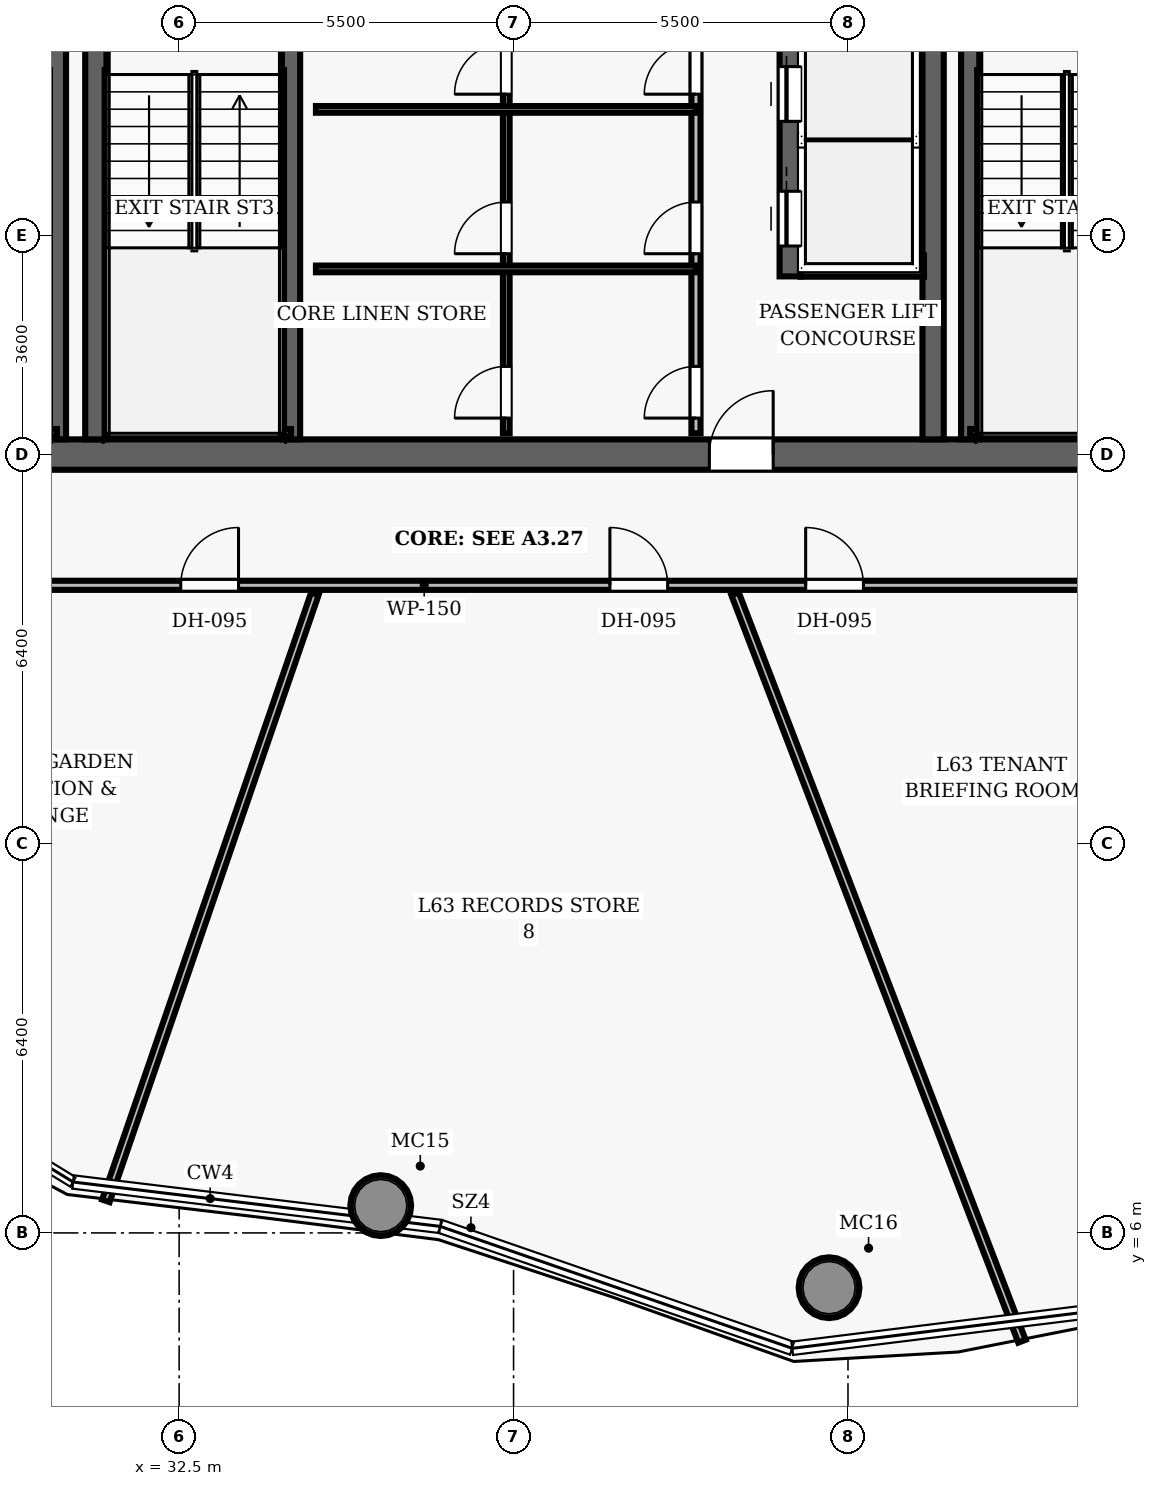
"""IFC4 building model, lengths in metres.
Left out: names, types, materials, properties, quantities, classifications, styles, units other than length and angle.
Written with IfcOpenShell. Run it as: python <this file> out.ifc"""

import sys

from ifc_helpers import new_model, si_unit, direction, frame, frame_2d, origin, origin_2d, place, context, subcontext, project, spatial, rectangle, hollow_circle, extrude, element, fill, save


model = new_model("IFC4")
c1 = context("Model", 3, precision=1e-05, world=origin(), true_north=direction((0.0, 1.0)))
c2 = subcontext(c1, "Body", "Model", "MODEL_VIEW")
j1 = project(units=[si_unit("LENGTHUNIT", "METRE"), si_unit("PLANEANGLEUNIT", "RADIAN")], contexts=[c1])
p1 = place(None, origin())
s1 = spatial("IfcSite", under=j1, at=p1, CompositionType="ELEMENT")
p2 = place(p1, origin())
s2 = spatial("IfcBuilding", under=s1, at=p2, CompositionType="ELEMENT")
p3 = place(p2, frame((0.0, 0.0, 249.75)))
s3 = spatial("IfcBuildingStorey", under=s2, at=p3, CompositionType="ELEMENT", Elevation=249.75)
p4 = place(p3, frame((26.75, 18.8, 0.0), z_axis=(0.0, 0.0, 1.0), x_axis=(1.0, 0.0, 0.0)))
e1 = element("IfcWall", 1, at=p4, inside=s3, PredefinedType="SHEAR", context=c2, shape_type="SweptSolid", body=[
    extrude(rectangle(XDim=22.5, YDim=0.5, at=frame_2d((11.25, 0.0))), origin(), (0.0, 0.0, 1.0), 3.85),
])
p5 = place(p4, frame((14.47, 0.0, 0.0)))
e2 = element("IfcOpeningElement", 2, at=p5, cuts=e1, PredefinedType="OPENING", context=c2, shape_type="SweptSolid", body=[
    extrude(rectangle(XDim=1.05, YDim=2.15, at=frame_2d((0.525, 1.075))), frame((0.0, 0.26, 0.0), z_axis=(0.0, -1.0, 0.0), x_axis=(1.0, 0.0, 0.0)), (0.0, 0.0, 1.0), 0.52),
])
for number, where, z_axis, x_axis in (
    (3, (31.13, 19.05, 0.0), (0.0, 0.0, 1.0), (0.0, 1.0, 0.0)),
    (4, (44.9, 19.05, 0.0), (0.0, 0.0, 1.0), (0.0, 1.0, 0.0)),
):
    element("IfcWall", number, at=place(p3, frame(where, z_axis=z_axis, x_axis=x_axis)), inside=s3, PredefinedType="SHEAR", context=c2, shape_type="SweptSolid", body=[
        extrude(rectangle(XDim=13.9, YDim=0.35, at=frame_2d((6.95, 0.0))), origin(), (0.0, 0.0, 1.0), 3.85),
    ])
for number, where, z_axis, x_axis in (
    (5, (35.815, 6.449, 0.0), (0.0, 0.0, 1.0), (1.0, 0.0, 0.0)),
    (6, (43.188, 5.099, 0.0), (0.0, 0.0, 1.0), (1.0, 0.0, 0.0)),
):
    element("IfcColumn", number, at=place(p3, frame(where, z_axis=z_axis, x_axis=x_axis)), inside=s3, PredefinedType="COLUMN", context=c2, shape_type="SweptSolid", body=[
        extrude(hollow_circle(Radius=0.5, WallThickness=0.045, at=origin_2d()), origin(), (0.0, 0.0, 1.0), 3.85),
    ])
p6 = place(p3, frame((30.49, 19.05, 0.0), z_axis=(0.0, 0.0, 1.0), x_axis=(0.0, 1.0, 0.0)))
e7 = element("IfcWall", 7, at=p6, inside=s3, PredefinedType="SHEAR", context=c2, shape_type="SweptSolid", body=[
    extrude(rectangle(XDim=7.5, YDim=0.3, at=frame_2d((3.75, 0.0))), origin(), (0.0, 0.0, 1.0), 3.85),
])
p7 = place(p3, frame((27.395, 19.16, 0.0), z_axis=(0.0, 0.0, 1.0), x_axis=(1.0, 0.0, 0.0)))
e8 = element("IfcWall", 8, at=p7, inside=s3, PredefinedType="SHEAR", context=c2, shape_type="SweptSolid", body=[
    extrude(rectangle(XDim=3.095, YDim=0.12, at=frame_2d((1.547, 0.0))), origin(), (0.0, 0.0, 1.0), 3.85),
])
p8 = place(p3, frame((45.51, 19.05, 0.0), z_axis=(0.0, 0.0, 1.0), x_axis=(0.0, 1.0, 0.0)))
e9 = element("IfcWall", 9, at=p8, inside=s3, PredefinedType="SHEAR", context=c2, shape_type="SweptSolid", body=[
    extrude(rectangle(XDim=7.5, YDim=0.3, at=frame_2d((3.75, 0.0))), origin(), (0.0, 0.0, 1.0), 3.85),
])
p9 = place(p3, frame((45.51, 19.16, 0.0), z_axis=(0.0, 0.0, 1.0), x_axis=(1.0, 0.0, 0.0)))
e10 = element("IfcWall", 10, at=p9, inside=s3, PredefinedType="SHEAR", context=c2, shape_type="SweptSolid", body=[
    extrude(rectangle(XDim=3.095, YDim=0.12, at=frame_2d((1.547, 0.0))), origin(), (0.0, 0.0, 1.0), 3.85),
])
p10 = place(p3, frame((34.34, 19.05, 0.0), z_axis=(0.0, 0.0, 1.0), x_axis=(0.0, 1.0, 0.0)))
e11 = element("IfcWall", 11, at=p10, inside=s3, PredefinedType="SHEAR", context=c2, shape_type="SweptSolid", body=[
    extrude(rectangle(XDim=7.5, YDim=0.3, at=frame_2d((3.75, 0.0))), origin(), (0.0, 0.0, 1.0), 3.85),
])
p11 = place(p3, frame((31.3, 19.16, 0.0), z_axis=(0.0, 0.0, 1.0), x_axis=(1.0, 0.0, 0.0)))
e12 = element("IfcWall", 12, at=p11, inside=s3, PredefinedType="SHEAR", context=c2, shape_type="SweptSolid", body=[
    extrude(rectangle(XDim=3.04, YDim=0.12, at=frame_2d((1.52, 0.0))), origin(), (0.0, 0.0, 1.0), 3.85),
])
p12 = place(p3, frame((42.55, 21.73, 0.0), z_axis=(0.0, 0.0, 1.0), x_axis=(0.0, 1.0, 0.0)))
e13 = element("IfcWall", 13, at=p12, inside=s3, PredefinedType="SHEAR", context=c2, shape_type="SweptSolid", body=[
    extrude(rectangle(XDim=6.54, YDim=0.35, at=frame_2d((3.27, 0.0))), origin(), (0.0, 0.0, 1.0), 3.04),
])
p13 = place(p12, frame((0.5, 0.0, 0.0)))
e14 = element("IfcOpeningElement", 14, at=p13, cuts=e13, PredefinedType="OPENING", context=c2, shape_type="SweptSolid", body=[
    extrude(rectangle(XDim=0.9, YDim=2.15, at=frame_2d((0.45, 1.075))), frame((0.0, 0.185, 0.0), z_axis=(0.0, -1.0, 0.0), x_axis=(1.0, 0.0, 0.0)), (0.0, 0.0, 1.0), 0.37),
])
p14 = place(p12, frame((2.55, 0.0, 0.0)))
e15 = element("IfcOpeningElement", 15, at=p14, cuts=e13, PredefinedType="OPENING", context=c2, shape_type="SweptSolid", body=[
    extrude(rectangle(XDim=0.9, YDim=2.15, at=frame_2d((0.45, 1.075))), frame((0.0, 0.185, 0.0), z_axis=(0.0, -1.0, 0.0), x_axis=(1.0, 0.0, 0.0)), (0.0, 0.0, 1.0), 0.37),
])
p15 = place(p12, frame((4.6, 0.0, 0.0)))
e16 = element("IfcOpeningElement", 16, at=p15, cuts=e13, PredefinedType="OPENING", context=c2, shape_type="SweptSolid", body=[
    extrude(rectangle(XDim=0.9, YDim=2.15, at=frame_2d((0.45, 1.075))), frame((0.0, 0.185, 0.0), z_axis=(0.0, -1.0, 0.0), x_axis=(1.0, 0.0, 0.0)), (0.0, 0.0, 1.0), 0.37),
])
p16 = place(p3, frame((42.72, 21.9, 0.0), z_axis=(0.0, 0.0, 1.0), x_axis=(1.0, 0.0, 0.0)))
e17 = element("IfcWall", 17, at=p16, inside=s3, PredefinedType="SHEAR", context=c2, shape_type="SweptSolid", body=[
    extrude(rectangle(XDim=2.03, YDim=0.35, at=frame_2d((1.015, 0.0))), origin(), (0.0, 0.0, 1.0), 3.04),
])
p17 = place(p3, frame((41.0, 19.15, 0.0), z_axis=(0.0, 0.0, 1.0), x_axis=(0.0, 1.0, 0.0)))
e18 = element("IfcWall", 18, at=p17, inside=s3, PredefinedType="PARTITIONING", context=c2, shape_type="SweptSolid", body=[
    extrude(rectangle(XDim=7.95, YDim=0.15, at=frame_2d((3.975, 0.0))), origin(), (0.0, 0.0, 1.0), 3.04),
])
p18 = place(p17, frame((0.25, 0.0, 0.0)))
e19 = element("IfcOpeningElement", 19, at=p18, cuts=e18, PredefinedType="OPENING", context=c2, shape_type="SweptSolid", body=[
    extrude(rectangle(XDim=0.85, YDim=2.1, at=frame_2d((0.425, 1.05))), frame((0.0, 0.085, 0.0), z_axis=(0.0, -1.0, 0.0), x_axis=(1.0, 0.0, 0.0)), (0.0, 0.0, 1.0), 0.17),
])
p19 = place(p17, frame((2.953, 0.0, 0.0)))
e20 = element("IfcOpeningElement", 20, at=p19, cuts=e18, PredefinedType="OPENING", context=c2, shape_type="SweptSolid", body=[
    extrude(rectangle(XDim=0.85, YDim=2.1, at=frame_2d((0.425, 1.05))), frame((0.0, 0.085, 0.0), z_axis=(0.0, -1.0, 0.0), x_axis=(1.0, 0.0, 0.0)), (0.0, 0.0, 1.0), 0.17),
])
p20 = place(p17, frame((5.576, 0.0, 0.0)))
e21 = element("IfcOpeningElement", 21, at=p20, cuts=e18, PredefinedType="OPENING", context=c2, shape_type="SweptSolid", body=[
    extrude(rectangle(XDim=0.85, YDim=2.1, at=frame_2d((0.425, 1.05))), frame((0.0, 0.085, 0.0), z_axis=(0.0, -1.0, 0.0), x_axis=(1.0, 0.0, 0.0)), (0.0, 0.0, 1.0), 0.17),
])
p21 = place(p3, frame((37.88, 19.15, 0.0), z_axis=(0.0, 0.0, 1.0), x_axis=(0.0, 1.0, 0.0)))
e22 = element("IfcWall", 22, at=p21, inside=s3, PredefinedType="PARTITIONING", context=c2, shape_type="SweptSolid", body=[
    extrude(rectangle(XDim=7.95, YDim=0.11, at=frame_2d((3.975, 0.0))), origin(), (0.0, 0.0, 1.0), 3.04),
])
p22 = place(p21, frame((0.25, 0.0, 0.0)))
e23 = element("IfcOpeningElement", 23, at=p22, cuts=e22, PredefinedType="OPENING", context=c2, shape_type="SweptSolid", body=[
    extrude(rectangle(XDim=0.85, YDim=2.1, at=frame_2d((0.425, 1.05))), frame((0.0, 0.065, 0.0), z_axis=(0.0, -1.0, 0.0), x_axis=(1.0, 0.0, 0.0)), (0.0, 0.0, 1.0), 0.13),
])
p23 = place(p21, frame((2.953, 0.0, 0.0)))
e24 = element("IfcOpeningElement", 24, at=p23, cuts=e22, PredefinedType="OPENING", context=c2, shape_type="SweptSolid", body=[
    extrude(rectangle(XDim=0.85, YDim=2.1, at=frame_2d((0.425, 1.05))), frame((0.0, 0.065, 0.0), z_axis=(0.0, -1.0, 0.0), x_axis=(1.0, 0.0, 0.0)), (0.0, 0.0, 1.0), 0.13),
])
p24 = place(p21, frame((5.576, 0.0, 0.0)))
e25 = element("IfcOpeningElement", 25, at=p24, cuts=e22, PredefinedType="OPENING", context=c2, shape_type="SweptSolid", body=[
    extrude(rectangle(XDim=0.85, YDim=2.1, at=frame_2d((0.425, 1.05))), frame((0.0, 0.065, 0.0), z_axis=(0.0, -1.0, 0.0), x_axis=(1.0, 0.0, 0.0)), (0.0, 0.0, 1.0), 0.13),
])
for number, where, z_axis, x_axis in (
    (26, (34.75, 21.853, 0.0), (0.0, 0.0, 1.0), (1.0, 0.0, 0.0)),
    (27, (34.75, 24.477, 0.0), (0.0, 0.0, 1.0), (1.0, 0.0, 0.0)),
):
    element("IfcWall", number, at=place(p3, frame(where, z_axis=z_axis, x_axis=x_axis)), inside=s3, PredefinedType="PARTITIONING", context=c2, shape_type="SweptSolid", body=[
        extrude(rectangle(XDim=6.25, YDim=0.11, at=frame_2d((3.125, 0.0))), origin(), (0.0, 0.0, 1.0), 3.04),
    ])
p25 = place(p3, frame((26.9, 16.65, 0.0), z_axis=(0.0, 0.0, 1.0), x_axis=(1.0, 0.0, 0.0)))
e28 = element("IfcWall", 28, at=p25, inside=s3, PredefinedType="PARTITIONING", context=c2, shape_type="SweptSolid", body=[
    extrude(rectangle(XDim=22.2, YDim=0.15, at=frame_2d((11.1, 0.0))), origin(), (0.0, 0.0, 1.0), 3.04),
])
p26 = place(p25, frame((5.627, 0.0, 0.0)))
e29 = element("IfcOpeningElement", 29, at=p26, cuts=e28, PredefinedType="OPENING", context=c2, shape_type="SweptSolid", body=[
    extrude(rectangle(XDim=0.95, YDim=2.15, at=frame_2d((0.475, 1.075))), frame((0.0, 0.085, 0.0), z_axis=(0.0, -1.0, 0.0), x_axis=(1.0, 0.0, 0.0)), (0.0, 0.0, 1.0), 0.17),
])
p27 = place(p25, frame((12.684, 0.0, 0.0)))
e30 = element("IfcOpeningElement", 30, at=p27, cuts=e28, PredefinedType="OPENING", context=c2, shape_type="SweptSolid", body=[
    extrude(rectangle(XDim=0.95, YDim=2.15, at=frame_2d((0.475, 1.075))), frame((0.0, 0.085, 0.0), z_axis=(0.0, -1.0, 0.0), x_axis=(1.0, 0.0, 0.0)), (0.0, 0.0, 1.0), 0.17),
])
p28 = place(p25, frame((15.904, 0.0, 0.0)))
e31 = element("IfcOpeningElement", 31, at=p28, cuts=e28, PredefinedType="OPENING", context=c2, shape_type="SweptSolid", body=[
    extrude(rectangle(XDim=0.95, YDim=2.15, at=frame_2d((0.475, 1.075))), frame((0.0, 0.085, 0.0), z_axis=(0.0, -1.0, 0.0), x_axis=(1.0, 0.0, 0.0)), (0.0, 0.0, 1.0), 0.17),
])
p29 = place(p3, frame((34.732, 16.51, 0.0), z_axis=(0.0, 0.0, 1.0), x_axis=(-0.325577330782, -0.945515415887, 0.0)))
e32 = element("IfcWall", 32, at=p29, inside=s3, PredefinedType="PARTITIONING", context=c2, shape_type="SweptSolid", body=[
    extrude(rectangle(XDim=10.558, YDim=0.13, at=frame_2d((5.279, 0.0))), origin(), (0.0, 0.0, 1.0), 3.04),
])
p30 = place(p3, frame((41.643, 16.51, 0.0), z_axis=(0.0, 0.0, 1.0), x_axis=(0.358373851229, -0.933578161032, 0.0)))
e33 = element("IfcWall", 33, at=p30, inside=s3, PredefinedType="PARTITIONING", context=c2, shape_type="SweptSolid", body=[
    extrude(rectangle(XDim=13.166, YDim=0.13, at=frame_2d((6.583, 0.0))), origin(), (0.0, 0.0, 1.0), 3.04),
])
p31 = place(p5, origin())
e34 = element("IfcDoor", 34, at=p31, inside=s3, OperationType="SINGLE_SWING_RIGHT", PredefinedType="DOOR", context=c2, shape_type="SweptSolid", body=[
    extrude(rectangle(XDim=1.05, YDim=2.15, at=frame_2d((0.525, 1.075))), frame((0.0, 0.025, 0.0), z_axis=(0.0, -1.0, 0.0), x_axis=(1.0, 0.0, 0.0)), (0.0, 0.0, 1.0), 0.05),
])
fill(e2, e34)
p32 = place(p18, origin())
e35 = element("IfcDoor", 35, at=p32, inside=s3, OperationType="SINGLE_SWING_LEFT", PredefinedType="DOOR", context=c2, shape_type="SweptSolid", body=[
    extrude(rectangle(XDim=0.85, YDim=2.1, at=frame_2d((0.425, 1.05))), frame((0.0, 0.025, 0.0), z_axis=(0.0, -1.0, 0.0), x_axis=(1.0, 0.0, 0.0)), (0.0, 0.0, 1.0), 0.05),
])
fill(e19, e35)
p33 = place(p22, origin())
e36 = element("IfcDoor", 36, at=p33, inside=s3, OperationType="SINGLE_SWING_LEFT", PredefinedType="DOOR", context=c2, shape_type="SweptSolid", body=[
    extrude(rectangle(XDim=0.85, YDim=2.1, at=frame_2d((0.425, 1.05))), frame((0.0, 0.025, 0.0), z_axis=(0.0, -1.0, 0.0), x_axis=(1.0, 0.0, 0.0)), (0.0, 0.0, 1.0), 0.05),
])
fill(e23, e36)
p34 = place(p19, origin())
e37 = element("IfcDoor", 37, at=p34, inside=s3, OperationType="SINGLE_SWING_LEFT", PredefinedType="DOOR", context=c2, shape_type="SweptSolid", body=[
    extrude(rectangle(XDim=0.85, YDim=2.1, at=frame_2d((0.425, 1.05))), frame((0.0, 0.025, 0.0), z_axis=(0.0, -1.0, 0.0), x_axis=(1.0, 0.0, 0.0)), (0.0, 0.0, 1.0), 0.05),
])
fill(e20, e37)
p35 = place(p23, origin())
e38 = element("IfcDoor", 38, at=p35, inside=s3, OperationType="SINGLE_SWING_LEFT", PredefinedType="DOOR", context=c2, shape_type="SweptSolid", body=[
    extrude(rectangle(XDim=0.85, YDim=2.1, at=frame_2d((0.425, 1.05))), frame((0.0, 0.025, 0.0), z_axis=(0.0, -1.0, 0.0), x_axis=(1.0, 0.0, 0.0)), (0.0, 0.0, 1.0), 0.05),
])
fill(e24, e38)
p36 = place(p20, origin())
e39 = element("IfcDoor", 39, at=p36, inside=s3, OperationType="SINGLE_SWING_LEFT", PredefinedType="DOOR", context=c2, shape_type="SweptSolid", body=[
    extrude(rectangle(XDim=0.85, YDim=2.1, at=frame_2d((0.425, 1.05))), frame((0.0, 0.025, 0.0), z_axis=(0.0, -1.0, 0.0), x_axis=(1.0, 0.0, 0.0)), (0.0, 0.0, 1.0), 0.05),
])
fill(e21, e39)
p37 = place(p24, origin())
e40 = element("IfcDoor", 40, at=p37, inside=s3, OperationType="SINGLE_SWING_LEFT", PredefinedType="DOOR", context=c2, shape_type="SweptSolid", body=[
    extrude(rectangle(XDim=0.85, YDim=2.1, at=frame_2d((0.425, 1.05))), frame((0.0, 0.025, 0.0), z_axis=(0.0, -1.0, 0.0), x_axis=(1.0, 0.0, 0.0)), (0.0, 0.0, 1.0), 0.05),
])
fill(e25, e40)
p38 = place(p26, origin())
e41 = element("IfcDoor", 41, at=p38, inside=s3, OperationType="SINGLE_SWING_RIGHT", PredefinedType="DOOR", context=c2, shape_type="SweptSolid", body=[
    extrude(rectangle(XDim=0.95, YDim=2.15, at=frame_2d((0.475, 1.075))), frame((0.0, 0.025, 0.0), z_axis=(0.0, -1.0, 0.0), x_axis=(1.0, 0.0, 0.0)), (0.0, 0.0, 1.0), 0.05),
])
fill(e29, e41)
p39 = place(p27, origin())
e42 = element("IfcDoor", 42, at=p39, inside=s3, OperationType="SINGLE_SWING_LEFT", PredefinedType="DOOR", context=c2, shape_type="SweptSolid", body=[
    extrude(rectangle(XDim=0.95, YDim=2.15, at=frame_2d((0.475, 1.075))), frame((0.0, 0.025, 0.0), z_axis=(0.0, -1.0, 0.0), x_axis=(1.0, 0.0, 0.0)), (0.0, 0.0, 1.0), 0.05),
])
fill(e30, e42)
p40 = place(p28, origin())
e43 = element("IfcDoor", 43, at=p40, inside=s3, OperationType="SINGLE_SWING_LEFT", PredefinedType="DOOR", context=c2, shape_type="SweptSolid", body=[
    extrude(rectangle(XDim=0.95, YDim=2.15, at=frame_2d((0.475, 1.075))), frame((0.0, 0.025, 0.0), z_axis=(0.0, -1.0, 0.0), x_axis=(1.0, 0.0, 0.0)), (0.0, 0.0, 1.0), 0.05),
])
fill(e31, e43)
p41 = place(p13, origin())
e44 = element("IfcDoor", 44, at=p41, inside=s3, OperationType="SLIDING_TO_LEFT", PredefinedType="DOOR", context=c2, shape_type="SweptSolid", body=[
    extrude(rectangle(XDim=0.9, YDim=2.15, at=frame_2d((0.45, 1.075))), frame((0.0, 0.025, 0.0), z_axis=(0.0, -1.0, 0.0), x_axis=(1.0, 0.0, 0.0)), (0.0, 0.0, 1.0), 0.05),
])
fill(e14, e44)
p42 = place(p14, origin())
e45 = element("IfcDoor", 45, at=p42, inside=s3, OperationType="SLIDING_TO_LEFT", PredefinedType="DOOR", context=c2, shape_type="SweptSolid", body=[
    extrude(rectangle(XDim=0.9, YDim=2.15, at=frame_2d((0.45, 1.075))), frame((0.0, 0.025, 0.0), z_axis=(0.0, -1.0, 0.0), x_axis=(1.0, 0.0, 0.0)), (0.0, 0.0, 1.0), 0.05),
])
fill(e15, e45)
save(model, sys.argv[1])
